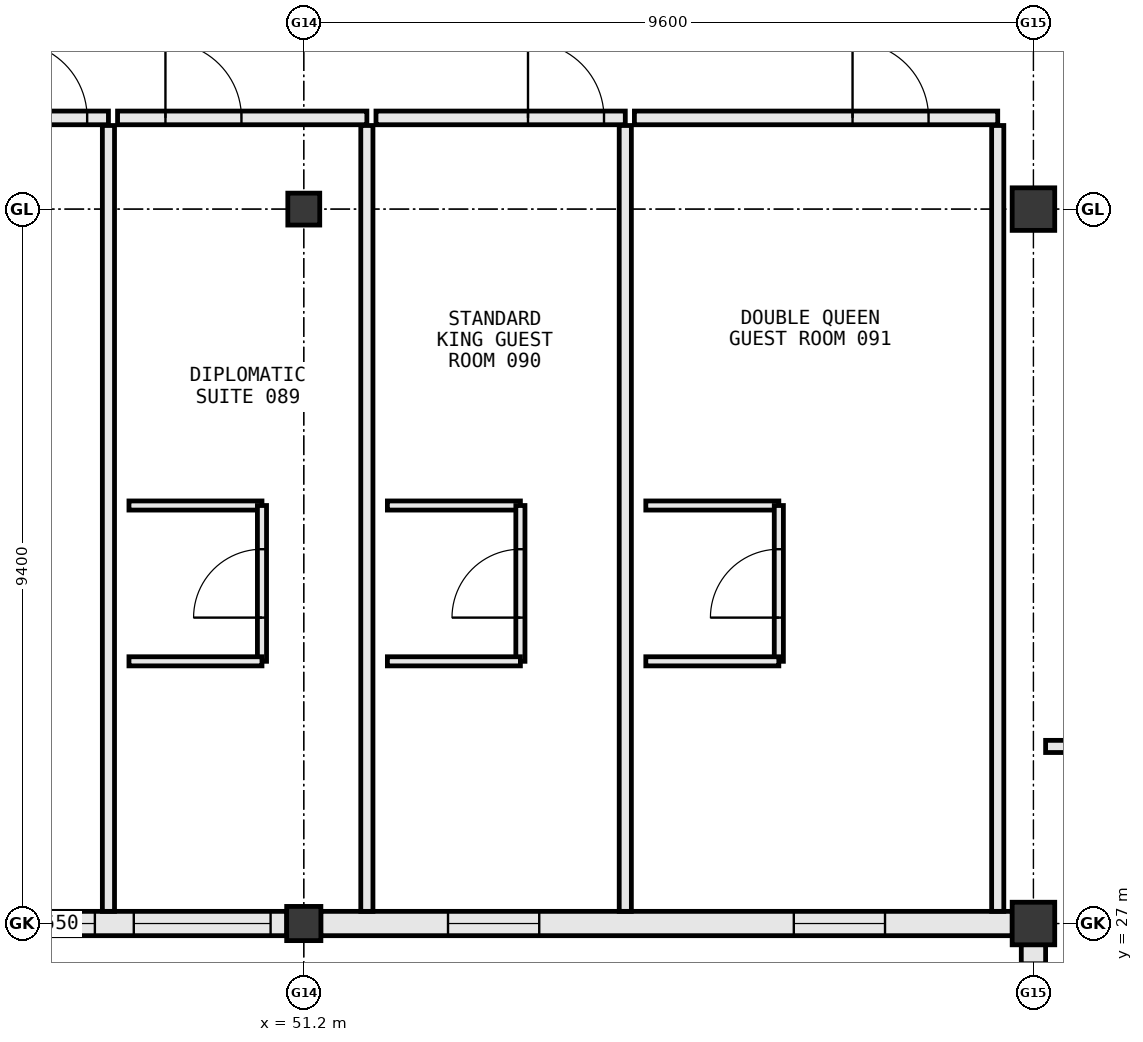
"""IFC4 building model, lengths in metres.
Left out: names, types, materials, properties, quantities, classifications, styles, units other than length and angle.
Written with IfcOpenShell. Run it as: python <this file> out.ifc"""

import sys

from ifc_helpers import new_model, si_unit, direction, frame, frame_2d, origin, origin_2d, place, context, subcontext, project, spatial, rectangle, extrude, element, fill, save


model = new_model("IFC4")
c1 = context("Model", 3, precision=1e-05, world=origin(), true_north=direction((0.0, 1.0)))
c2 = subcontext(c1, "Body", "Model", "MODEL_VIEW")
j1 = project(units=[si_unit("LENGTHUNIT", "METRE"), si_unit("PLANEANGLEUNIT", "RADIAN")], contexts=[c1])
p1 = place(None, origin())
s1 = spatial("IfcSite", under=j1, at=p1, CompositionType="ELEMENT")
p2 = place(p1, origin())
s2 = spatial("IfcBuilding", under=s1, at=p2, CompositionType="ELEMENT")
p3 = place(p2, frame((0.0, 0.0, 16.2)))
s3 = spatial("IfcBuildingStorey", under=s2, at=p3, CompositionType="ELEMENT", Elevation=16.2)
for number, where, z_axis, x_axis in (
    (1, (60.8, 27.0, 0.0), (0.0, 0.0, 1.0), (1.0, 0.0, 0.0)),
    (2, (60.8, 36.4, 0.0), (0.0, 0.0, 1.0), (1.0, 0.0, 0.0)),
):
    element("IfcColumn", number, at=place(p3, frame(where, z_axis=z_axis, x_axis=x_axis)), inside=s3, PredefinedType="COLUMN", context=c2, shape_type="SweptSolid", body=[
        extrude(rectangle(XDim=0.56, YDim=0.56, at=origin_2d()), origin(), (0.0, 0.0, 1.0), 3.8),
    ])
p4 = place(p3, frame((51.2, 27.0, 0.0), z_axis=(0.0, 0.0, 1.0), x_axis=(1.0, 0.0, 0.0)))
e3 = element("IfcColumn", 3, at=p4, inside=s3, PredefinedType="COLUMN", context=c2, shape_type="SweptSolid", body=[
    extrude(rectangle(XDim=0.45, YDim=0.45, at=origin_2d()), origin(), (0.0, 0.0, 1.0), 3.8),
])
p5 = place(p3, frame((51.2, 36.4, 0.0), z_axis=(0.0, 0.0, 1.0), x_axis=(1.0, 0.0, 0.0)))
e4 = element("IfcColumn", 4, at=p5, inside=s3, PredefinedType="COLUMN", context=c2, shape_type="SweptSolid", body=[
    extrude(rectangle(XDim=0.42, YDim=0.42, at=origin_2d()), origin(), (0.0, 0.0, 1.0), 3.8),
])
p6 = place(p3, frame((46.623, 27.0, 0.0), z_axis=(0.0, 0.0, 1.0), x_axis=(1.0, 0.0, 0.0)))
e5 = element("IfcWall", 5, at=p6, inside=s3, PredefinedType="STANDARD", context=c2, shape_type="SweptSolid", body=[
    extrude(rectangle(XDim=4.354, YDim=0.32, at=frame_2d((2.177, 0.0))), origin(), (0.0, 0.0, 1.0), 3.015),
])
p7 = place(p6, frame((0.178, 0.0, 0.85)))
e6 = element("IfcOpeningElement", 6, at=p7, cuts=e5, PredefinedType="OPENING", context=c2, shape_type="SweptSolid", body=[
    extrude(rectangle(XDim=1.65, YDim=1.8, at=frame_2d((0.825, 0.9))), frame((0.0, 0.172, 0.0), z_axis=(0.0, -1.0, 0.0), x_axis=(1.0, 0.0, 0.0)), (0.0, 0.0, 1.0), 0.344),
])
p8 = place(p6, frame((2.341, 0.0, 0.85)))
e7 = element("IfcOpeningElement", 7, at=p8, cuts=e5, PredefinedType="OPENING", context=c2, shape_type="SweptSolid", body=[
    extrude(rectangle(XDim=1.8, YDim=1.85, at=frame_2d((0.9, 0.925))), frame((0.0, 0.172, 0.0), z_axis=(0.0, -1.0, 0.0), x_axis=(1.0, 0.0, 0.0)), (0.0, 0.0, 1.0), 0.344),
])
p9 = place(p3, frame((51.423, 27.0, 0.0), z_axis=(0.0, 0.0, 1.0), x_axis=(1.0, 0.0, 0.0)))
e8 = element("IfcWall", 8, at=p9, inside=s3, PredefinedType="STANDARD", context=c2, shape_type="SweptSolid", body=[
    extrude(rectangle(XDim=9.099, YDim=0.32, at=frame_2d((4.549, 0.0))), origin(), (0.0, 0.0, 1.0), 2.795),
])
p10 = place(p9, frame((1.675, 0.0, 0.85)))
e9 = element("IfcOpeningElement", 9, at=p10, cuts=e8, PredefinedType="OPENING", context=c2, shape_type="SweptSolid", body=[
    extrude(rectangle(XDim=1.2, YDim=1.55, at=frame_2d((0.6, 0.775))), frame((0.0, 0.172, 0.0), z_axis=(0.0, -1.0, 0.0), x_axis=(1.0, 0.0, 0.0)), (0.0, 0.0, 1.0), 0.344),
])
p11 = place(p9, frame((6.224, 0.0, 0.85)))
e10 = element("IfcOpeningElement", 10, at=p11, cuts=e8, PredefinedType="OPENING", context=c2, shape_type="SweptSolid", body=[
    extrude(rectangle(XDim=1.2, YDim=1.55, at=frame_2d((0.6, 0.775))), frame((0.0, 0.172, 0.0), z_axis=(0.0, -1.0, 0.0), x_axis=(1.0, 0.0, 0.0)), (0.0, 0.0, 1.0), 0.344),
])
p12 = place(p3, frame((60.8, 26.722, 0.0), z_axis=(0.0, 0.0, 1.0), x_axis=(0.0, -1.0, 0.0)))
e11 = element("IfcWall", 11, at=p12, inside=s3, PredefinedType="STANDARD", context=c2, shape_type="SweptSolid", body=[
    extrude(rectangle(XDim=7.844, YDim=0.32, at=frame_2d((3.922, 0.0))), origin(), (0.0, 0.0, 1.0), 3.015),
])
p13 = place(p12, frame((5.318, 0.0, 0.85)))
e12 = element("IfcOpeningElement", 12, at=p13, cuts=e11, PredefinedType="OPENING", context=c2, shape_type="SweptSolid", body=[
    extrude(rectangle(XDim=1.8, YDim=1.85, at=frame_2d((0.9, 0.925))), frame((0.0, 0.172, 0.0), z_axis=(0.0, -1.0, 0.0), x_axis=(1.0, 0.0, 0.0)), (0.0, 0.0, 1.0), 0.344),
])
p14 = place(p12, frame((1.932, 0.0, 0.85)))
e13 = element("IfcOpeningElement", 13, at=p14, cuts=e11, PredefinedType="OPENING", context=c2, shape_type="SweptSolid", body=[
    extrude(rectangle(XDim=1.8, YDim=1.85, at=frame_2d((0.9, 0.925))), frame((0.0, 0.172, 0.0), z_axis=(0.0, -1.0, 0.0), x_axis=(1.0, 0.0, 0.0)), (0.0, 0.0, 1.0), 0.344),
])
p15 = place(p12, frame((0.236, 0.0, 0.85)))
e14 = element("IfcOpeningElement", 14, at=p15, cuts=e11, PredefinedType="OPENING", context=c2, shape_type="SweptSolid", body=[
    extrude(rectangle(XDim=0.6, YDim=1.4, at=frame_2d((0.3, 0.7))), frame((0.0, 0.172, 0.0), z_axis=(0.0, -1.0, 0.0), x_axis=(1.0, 0.0, 0.0)), (0.0, 0.0, 1.0), 0.344),
])
p16 = place(p3, frame((60.96, 29.33, 0.0), z_axis=(0.0, 0.0, 1.0), x_axis=(1.0, 0.0, 0.0)))
e15 = element("IfcWall", 15, at=p16, inside=s3, PredefinedType="PARTITIONING", context=c2, shape_type="SweptSolid", body=[
    extrude(rectangle(XDim=6.94, YDim=0.16, at=frame_2d((3.47, 0.0))), origin(), (0.0, 0.0, 1.0), 3.56),
])
p17 = place(p3, frame((48.63, 37.6, 0.0), z_axis=(0.0, 0.0, 1.0), x_axis=(-1.0, 0.0, 0.0)))
e16 = element("IfcWall", 16, at=p17, inside=s3, PredefinedType="PARTITIONING", context=c2, shape_type="SweptSolid", body=[
    extrude(rectangle(XDim=3.28, YDim=0.18, at=frame_2d((1.64, 0.0))), origin(), (0.0, 0.0, 1.0), 3.56),
])
p18 = place(p17, frame((0.28, 0.0, 0.0)))
e17 = element("IfcOpeningElement", 17, at=p18, cuts=e16, PredefinedType="OPENING", context=c2, shape_type="SweptSolid", body=[
    extrude(rectangle(XDim=1.0, YDim=2.2, at=frame_2d((0.5, 1.1))), frame((0.0, 0.102, 0.0), z_axis=(0.0, -1.0, 0.0), x_axis=(1.0, 0.0, 0.0)), (0.0, 0.0, 1.0), 0.204),
])
p19 = place(p3, frame((48.63, 27.16, 0.0), z_axis=(0.0, 0.0, 1.0), x_axis=(0.0, 1.0, 0.0)))
e18 = element("IfcWall", 18, at=p19, inside=s3, PredefinedType="PARTITIONING", context=c2, shape_type="SweptSolid", body=[
    extrude(rectangle(XDim=10.34, YDim=0.16, at=frame_2d((5.17, 0.0))), origin(), (0.0, 0.0, 1.0), 3.06),
])
p20 = place(p3, frame((52.03, 37.6, 0.0), z_axis=(0.0, 0.0, 1.0), x_axis=(-1.0, 0.0, 0.0)))
e19 = element("IfcWall", 19, at=p20, inside=s3, PredefinedType="PARTITIONING", context=c2, shape_type="SweptSolid", body=[
    extrude(rectangle(XDim=3.28, YDim=0.18, at=frame_2d((1.64, 0.0))), origin(), (0.0, 0.0, 1.0), 3.56),
])
p21 = place(p20, frame((1.65, 0.0, 0.0)))
e20 = element("IfcOpeningElement", 20, at=p21, cuts=e19, PredefinedType="OPENING", context=c2, shape_type="SweptSolid", body=[
    extrude(rectangle(XDim=1.0, YDim=2.2, at=frame_2d((0.5, 1.1))), frame((0.0, 0.102, 0.0), z_axis=(0.0, -1.0, 0.0), x_axis=(1.0, 0.0, 0.0)), (0.0, 0.0, 1.0), 0.204),
])
p22 = place(p3, frame((52.03, 27.16, 0.0), z_axis=(0.0, 0.0, 1.0), x_axis=(0.0, 1.0, 0.0)))
e21 = element("IfcWall", 21, at=p22, inside=s3, PredefinedType="PARTITIONING", context=c2, shape_type="SweptSolid", body=[
    extrude(rectangle(XDim=10.34, YDim=0.16, at=frame_2d((5.17, 0.0))), origin(), (0.0, 0.0, 1.0), 3.56),
])
p23 = place(p3, frame((48.9, 32.5, 0.0), z_axis=(0.0, 0.0, 1.0), x_axis=(1.0, 0.0, 0.0)))
e22 = element("IfcWall", 22, at=p23, inside=s3, PredefinedType="PARTITIONING", context=c2, shape_type="SweptSolid", body=[
    extrude(rectangle(XDim=1.75, YDim=0.12, at=frame_2d((0.875, 0.0))), origin(), (0.0, 0.0, 1.0), 3.56),
])
p24 = place(p3, frame((50.65, 30.45, 0.0), z_axis=(0.0, 0.0, 1.0), x_axis=(0.0, 1.0, 0.0)))
e23 = element("IfcWall", 23, at=p24, inside=s3, PredefinedType="PARTITIONING", context=c2, shape_type="SweptSolid", body=[
    extrude(rectangle(XDim=2.05, YDim=0.12, at=frame_2d((1.025, 0.0))), origin(), (0.0, 0.0, 1.0), 3.56),
])
p25 = place(p24, frame((0.575, 0.0, 0.0)))
e24 = element("IfcOpeningElement", 24, at=p25, cuts=e23, PredefinedType="OPENING", context=c2, shape_type="SweptSolid", body=[
    extrude(rectangle(XDim=0.9, YDim=2.15, at=frame_2d((0.45, 1.075))), frame((0.0, 0.072, 0.0), z_axis=(0.0, -1.0, 0.0), x_axis=(1.0, 0.0, 0.0)), (0.0, 0.0, 1.0), 0.144),
])
p26 = place(p3, frame((48.9, 30.45, 0.0), z_axis=(0.0, 0.0, 1.0), x_axis=(1.0, 0.0, 0.0)))
e25 = element("IfcWall", 25, at=p26, inside=s3, PredefinedType="PARTITIONING", context=c2, shape_type="SweptSolid", body=[
    extrude(rectangle(XDim=1.75, YDim=0.12, at=frame_2d((0.875, 0.0))), origin(), (0.0, 0.0, 1.0), 3.56),
])
p27 = place(p3, frame((55.43, 37.6, 0.0), z_axis=(0.0, 0.0, 1.0), x_axis=(-1.0, 0.0, 0.0)))
e26 = element("IfcWall", 26, at=p27, inside=s3, PredefinedType="PARTITIONING", context=c2, shape_type="SweptSolid", body=[
    extrude(rectangle(XDim=3.28, YDim=0.18, at=frame_2d((1.64, 0.0))), origin(), (0.0, 0.0, 1.0), 3.56),
])
p28 = place(p27, frame((0.28, 0.0, 0.0)))
e27 = element("IfcOpeningElement", 27, at=p28, cuts=e26, PredefinedType="OPENING", context=c2, shape_type="SweptSolid", body=[
    extrude(rectangle(XDim=1.0, YDim=2.2, at=frame_2d((0.5, 1.1))), frame((0.0, 0.102, 0.0), z_axis=(0.0, -1.0, 0.0), x_axis=(1.0, 0.0, 0.0)), (0.0, 0.0, 1.0), 0.204),
])
p29 = place(p3, frame((55.43, 27.16, 0.0), z_axis=(0.0, 0.0, 1.0), x_axis=(0.0, 1.0, 0.0)))
e28 = element("IfcWall", 28, at=p29, inside=s3, PredefinedType="PARTITIONING", context=c2, shape_type="SweptSolid", body=[
    extrude(rectangle(XDim=10.34, YDim=0.16, at=frame_2d((5.17, 0.0))), origin(), (0.0, 0.0, 1.0), 3.56),
])
p30 = place(p3, frame((52.3, 32.5, 0.0), z_axis=(0.0, 0.0, 1.0), x_axis=(1.0, 0.0, 0.0)))
e29 = element("IfcWall", 29, at=p30, inside=s3, PredefinedType="PARTITIONING", context=c2, shape_type="SweptSolid", body=[
    extrude(rectangle(XDim=1.75, YDim=0.12, at=frame_2d((0.875, 0.0))), origin(), (0.0, 0.0, 1.0), 3.56),
])
p31 = place(p3, frame((54.05, 30.45, 0.0), z_axis=(0.0, 0.0, 1.0), x_axis=(0.0, 1.0, 0.0)))
e30 = element("IfcWall", 30, at=p31, inside=s3, PredefinedType="PARTITIONING", context=c2, shape_type="SweptSolid", body=[
    extrude(rectangle(XDim=2.05, YDim=0.12, at=frame_2d((1.025, 0.0))), origin(), (0.0, 0.0, 1.0), 3.105),
])
p32 = place(p31, frame((0.575, 0.0, 0.0)))
e31 = element("IfcOpeningElement", 31, at=p32, cuts=e30, PredefinedType="OPENING", context=c2, shape_type="SweptSolid", body=[
    extrude(rectangle(XDim=0.9, YDim=2.15, at=frame_2d((0.45, 1.075))), frame((0.0, 0.072, 0.0), z_axis=(0.0, -1.0, 0.0), x_axis=(1.0, 0.0, 0.0)), (0.0, 0.0, 1.0), 0.144),
])
p33 = place(p3, frame((52.3, 30.45, 0.0), z_axis=(0.0, 0.0, 1.0), x_axis=(1.0, 0.0, 0.0)))
e32 = element("IfcWall", 32, at=p33, inside=s3, PredefinedType="PARTITIONING", context=c2, shape_type="SweptSolid", body=[
    extrude(rectangle(XDim=1.75, YDim=0.12, at=frame_2d((0.875, 0.0))), origin(), (0.0, 0.0, 1.0), 3.56),
])
p34 = place(p3, frame((60.33, 37.6, 0.0), z_axis=(0.0, 0.0, 1.0), x_axis=(-1.0, 0.0, 0.0)))
e33 = element("IfcWall", 33, at=p34, inside=s3, PredefinedType="PARTITIONING", context=c2, shape_type="SweptSolid", body=[
    extrude(rectangle(XDim=4.78, YDim=0.18, at=frame_2d((2.39, 0.0))), origin(), (0.0, 0.0, 1.0), 3.56),
])
p35 = place(p34, frame((0.91, 0.0, 0.0)))
e34 = element("IfcOpeningElement", 34, at=p35, cuts=e33, PredefinedType="OPENING", context=c2, shape_type="SweptSolid", body=[
    extrude(rectangle(XDim=1.0, YDim=2.2, at=frame_2d((0.5, 1.1))), frame((0.0, 0.102, 0.0), z_axis=(0.0, -1.0, 0.0), x_axis=(1.0, 0.0, 0.0)), (0.0, 0.0, 1.0), 0.204),
])
p36 = place(p3, frame((60.33, 27.16, 0.0), z_axis=(0.0, 0.0, 1.0), x_axis=(0.0, 1.0, 0.0)))
e35 = element("IfcWall", 35, at=p36, inside=s3, PredefinedType="PARTITIONING", context=c2, shape_type="SweptSolid", body=[
    extrude(rectangle(XDim=10.34, YDim=0.16, at=frame_2d((5.17, 0.0))), origin(), (0.0, 0.0, 1.0), 3.56),
])
p37 = place(p3, frame((55.7, 32.5, 0.0), z_axis=(0.0, 0.0, 1.0), x_axis=(1.0, 0.0, 0.0)))
e36 = element("IfcWall", 36, at=p37, inside=s3, PredefinedType="PARTITIONING", context=c2, shape_type="SweptSolid", body=[
    extrude(rectangle(XDim=1.75, YDim=0.12, at=frame_2d((0.875, 0.0))), origin(), (0.0, 0.0, 1.0), 3.56),
])
p38 = place(p3, frame((57.45, 30.45, 0.0), z_axis=(0.0, 0.0, 1.0), x_axis=(0.0, 1.0, 0.0)))
e37 = element("IfcWall", 37, at=p38, inside=s3, PredefinedType="PARTITIONING", context=c2, shape_type="SweptSolid", body=[
    extrude(rectangle(XDim=2.05, YDim=0.12, at=frame_2d((1.025, 0.0))), origin(), (0.0, 0.0, 1.0), 3.105),
])
p39 = place(p38, frame((0.575, 0.0, 0.0)))
e38 = element("IfcOpeningElement", 38, at=p39, cuts=e37, PredefinedType="OPENING", context=c2, shape_type="SweptSolid", body=[
    extrude(rectangle(XDim=0.9, YDim=2.15, at=frame_2d((0.45, 1.075))), frame((0.0, 0.072, 0.0), z_axis=(0.0, -1.0, 0.0), x_axis=(1.0, 0.0, 0.0)), (0.0, 0.0, 1.0), 0.144),
])
p40 = place(p3, frame((55.7, 30.45, 0.0), z_axis=(0.0, 0.0, 1.0), x_axis=(1.0, 0.0, 0.0)))
e39 = element("IfcWall", 39, at=p40, inside=s3, PredefinedType="PARTITIONING", context=c2, shape_type="SweptSolid", body=[
    extrude(rectangle(XDim=1.75, YDim=0.12, at=frame_2d((0.875, 0.0))), origin(), (0.0, 0.0, 1.0), 3.56),
])
p41 = place(p10, origin())
e40 = element("IfcWindow", 40, at=p41, inside=s3, PartitioningType="SINGLE_PANEL", PredefinedType="WINDOW", context=c2, shape_type="SweptSolid", body=[
    extrude(rectangle(XDim=1.2, YDim=1.55, at=frame_2d((0.6, 0.775))), frame((0.0, 0.03, 0.0), z_axis=(0.0, -1.0, 0.0), x_axis=(1.0, 0.0, 0.0)), (0.0, 0.0, 1.0), 0.06),
])
fill(e9, e40)
p42 = place(p11, origin())
e41 = element("IfcWindow", 41, at=p42, inside=s3, PartitioningType="SINGLE_PANEL", PredefinedType="WINDOW", context=c2, shape_type="SweptSolid", body=[
    extrude(rectangle(XDim=1.2, YDim=1.55, at=frame_2d((0.6, 0.775))), frame((0.0, 0.03, 0.0), z_axis=(0.0, -1.0, 0.0), x_axis=(1.0, 0.0, 0.0)), (0.0, 0.0, 1.0), 0.06),
])
fill(e10, e41)
p43 = place(p7, origin())
e42 = element("IfcWindow", 42, at=p43, inside=s3, PartitioningType="SINGLE_PANEL", PredefinedType="WINDOW", context=c2, shape_type="SweptSolid", body=[
    extrude(rectangle(XDim=1.65, YDim=1.8, at=frame_2d((0.825, 0.9))), frame((0.0, 0.03, 0.0), z_axis=(0.0, -1.0, 0.0), x_axis=(1.0, 0.0, 0.0)), (0.0, 0.0, 1.0), 0.06),
])
fill(e6, e42)
p44 = place(p8, origin())
e43 = element("IfcWindow", 43, at=p44, inside=s3, PartitioningType="SINGLE_PANEL", PredefinedType="WINDOW", context=c2, shape_type="SweptSolid", body=[
    extrude(rectangle(XDim=1.8, YDim=1.85, at=frame_2d((0.9, 0.925))), frame((0.0, 0.03, 0.0), z_axis=(0.0, -1.0, 0.0), x_axis=(1.0, 0.0, 0.0)), (0.0, 0.0, 1.0), 0.06),
])
fill(e7, e43)
p45 = place(p18, frame((1.0, 0.0, 0.0), z_axis=(0.0, 0.0, 1.0), x_axis=(-1.0, 0.0, 0.0)))
e44 = element("IfcDoor", 44, at=p45, inside=s3, OperationType="SINGLE_SWING_RIGHT", PredefinedType="DOOR", context=c2, shape_type="SweptSolid", body=[
    extrude(rectangle(XDim=1.0, YDim=2.2, at=frame_2d((0.5, 1.1))), frame((0.0, 0.025, 0.0), z_axis=(0.0, -1.0, 0.0), x_axis=(1.0, 0.0, 0.0)), (0.0, 0.0, 1.0), 0.05),
])
fill(e17, e44)
p46 = place(p21, frame((1.0, 0.0, 0.0), z_axis=(0.0, 0.0, 1.0), x_axis=(-1.0, 0.0, 0.0)))
e45 = element("IfcDoor", 45, at=p46, inside=s3, OperationType="SINGLE_SWING_RIGHT", PredefinedType="DOOR", context=c2, shape_type="SweptSolid", body=[
    extrude(rectangle(XDim=1.0, YDim=2.2, at=frame_2d((0.5, 1.1))), frame((0.0, 0.025, 0.0), z_axis=(0.0, -1.0, 0.0), x_axis=(1.0, 0.0, 0.0)), (0.0, 0.0, 1.0), 0.05),
])
fill(e20, e45)
p47 = place(p25, origin())
e46 = element("IfcDoor", 46, at=p47, inside=s3, OperationType="SINGLE_SWING_LEFT", PredefinedType="DOOR", context=c2, shape_type="SweptSolid", body=[
    extrude(rectangle(XDim=0.9, YDim=2.15, at=frame_2d((0.45, 1.075))), frame((0.0, 0.025, 0.0), z_axis=(0.0, -1.0, 0.0), x_axis=(1.0, 0.0, 0.0)), (0.0, 0.0, 1.0), 0.05),
])
fill(e24, e46)
p48 = place(p28, frame((1.0, 0.0, 0.0), z_axis=(0.0, 0.0, 1.0), x_axis=(-1.0, 0.0, 0.0)))
e47 = element("IfcDoor", 47, at=p48, inside=s3, OperationType="SINGLE_SWING_RIGHT", PredefinedType="DOOR", context=c2, shape_type="SweptSolid", body=[
    extrude(rectangle(XDim=1.0, YDim=2.2, at=frame_2d((0.5, 1.1))), frame((0.0, 0.025, 0.0), z_axis=(0.0, -1.0, 0.0), x_axis=(1.0, 0.0, 0.0)), (0.0, 0.0, 1.0), 0.05),
])
fill(e27, e47)
p49 = place(p32, origin())
e48 = element("IfcDoor", 48, at=p49, inside=s3, OperationType="SINGLE_SWING_LEFT", PredefinedType="DOOR", context=c2, shape_type="SweptSolid", body=[
    extrude(rectangle(XDim=0.9, YDim=2.15, at=frame_2d((0.45, 1.075))), frame((0.0, 0.025, 0.0), z_axis=(0.0, -1.0, 0.0), x_axis=(1.0, 0.0, 0.0)), (0.0, 0.0, 1.0), 0.05),
])
fill(e31, e48)
p50 = place(p35, frame((1.0, 0.0, 0.0), z_axis=(0.0, 0.0, 1.0), x_axis=(-1.0, 0.0, 0.0)))
e49 = element("IfcDoor", 49, at=p50, inside=s3, OperationType="SINGLE_SWING_RIGHT", PredefinedType="DOOR", context=c2, shape_type="SweptSolid", body=[
    extrude(rectangle(XDim=1.0, YDim=2.2, at=frame_2d((0.5, 1.1))), frame((0.0, 0.025, 0.0), z_axis=(0.0, -1.0, 0.0), x_axis=(1.0, 0.0, 0.0)), (0.0, 0.0, 1.0), 0.05),
])
fill(e34, e49)
p51 = place(p39, origin())
e50 = element("IfcDoor", 50, at=p51, inside=s3, OperationType="SINGLE_SWING_LEFT", PredefinedType="DOOR", context=c2, shape_type="SweptSolid", body=[
    extrude(rectangle(XDim=0.9, YDim=2.15, at=frame_2d((0.45, 1.075))), frame((0.0, 0.025, 0.0), z_axis=(0.0, -1.0, 0.0), x_axis=(1.0, 0.0, 0.0)), (0.0, 0.0, 1.0), 0.05),
])
fill(e38, e50)
save(model, sys.argv[1])
